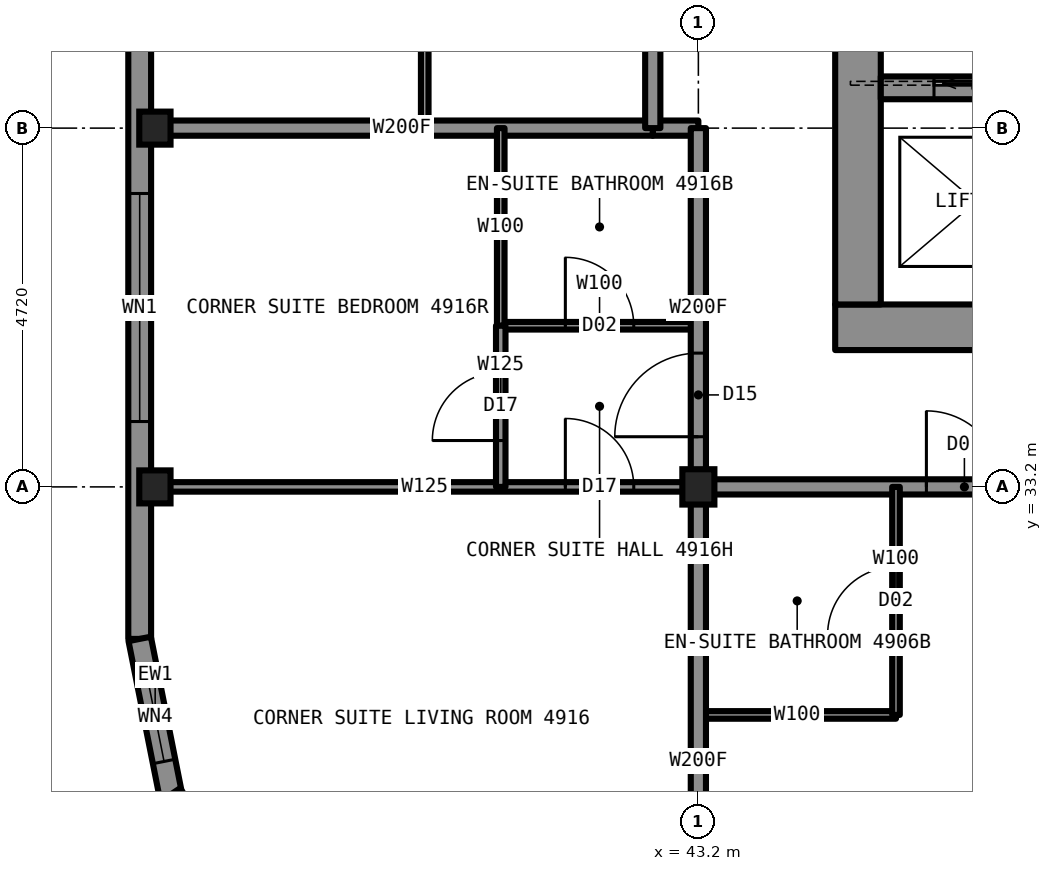
"""IFC4 building model, lengths in metres.
Left out: names, types, materials, properties, quantities, classifications, styles, units other than length and angle.
Written with IfcOpenShell. Run it as: python <this file> out.ifc"""

import sys

from ifc_helpers import new_model, si_unit, direction, frame, frame_2d, origin, origin_2d, place, context, subcontext, project, spatial, rectangle, i_section, extrude, element, fill, save


model = new_model("IFC4")
c1 = context("Model", 3, precision=1e-05, world=origin(), true_north=direction((0.0, 1.0)))
c2 = subcontext(c1, "Body", "Model", "MODEL_VIEW")
j1 = project(units=[si_unit("LENGTHUNIT", "METRE"), si_unit("PLANEANGLEUNIT", "RADIAN")], contexts=[c1])
p1 = place(None, origin())
s1 = spatial("IfcSite", under=j1, at=p1, CompositionType="ELEMENT")
p2 = place(p1, origin())
s2 = spatial("IfcBuilding", under=s1, at=p2, CompositionType="ELEMENT")
p3 = place(p2, frame((0.0, 0.0, 182.8)))
s3 = spatial("IfcBuildingStorey", under=s2, at=p3, CompositionType="ELEMENT", Elevation=182.8)
for number, where, z_axis, x_axis in (
    (1, (36.05, 33.2, 0.0), (0.0, 0.0, 1.0), (1.0, 0.0, 0.0)),
    (2, (36.05, 37.92, 0.0), (0.0, 0.0, 1.0), (1.0, 0.0, 0.0)),
):
    element("IfcColumn", number, at=place(p3, frame(where, z_axis=z_axis, x_axis=x_axis)), inside=s3, PredefinedType="COLUMN", context=c2, shape_type="SweptSolid", body=[
        extrude(i_section(OverallWidth=0.411, OverallDepth=0.434, WebThickness=0.036, FlangeThickness=0.057, at=origin_2d()), origin(), (0.0, 0.0, 1.0), 3.5),
    ])
p4 = place(p3, frame((43.2, 33.2, 0.0), z_axis=(0.0, 0.0, 1.0), x_axis=(1.0, 0.0, 0.0)))
e3 = element("IfcColumn", 3, at=p4, inside=s3, PredefinedType="COLUMN", context=c2, shape_type="SweptSolid", body=[
    extrude(i_section(OverallWidth=0.422, OverallDepth=0.465, WebThickness=0.045, FlangeThickness=0.073, at=origin_2d()), origin(), (0.0, 0.0, 1.0), 3.5),
])
p5 = place(p3, frame((45.0, 35.3, 0.0), z_axis=(0.0, 0.0, 1.0), x_axis=(1.0, 0.0, 0.0)))
e4 = element("IfcWall", 4, at=p5, inside=s3, PredefinedType="SHEAR", context=c2, shape_type="SweptSolid", body=[
    extrude(rectangle(XDim=20.0, YDim=0.6, at=frame_2d((10.0, 0.0))), origin(), (0.0, 0.0, 1.0), 3.5),
])
p6 = place(p3, frame((45.3, 35.6, 0.0), z_axis=(0.0, 0.0, 1.0), x_axis=(0.0, 1.0, 0.0)))
e5 = element("IfcWall", 5, at=p6, inside=s3, PredefinedType="SHEAR", context=c2, shape_type="SweptSolid", body=[
    extrude(rectangle(XDim=18.8, YDim=0.6, at=frame_2d((9.4, 0.0))), origin(), (0.0, 0.0, 1.0), 3.5),
])
p7 = place(p6, frame((13.4, 0.0, 0.0)))
e6 = element("IfcOpeningElement", 6, at=p7, cuts=e5, PredefinedType="OPENING", context=c2, shape_type="SweptSolid", body=[
    extrude(rectangle(XDim=1.8, YDim=2.2, at=frame_2d((0.9, 1.1))), frame((0.0, 0.31, 0.0), z_axis=(0.0, -1.0, 0.0), x_axis=(1.0, 0.0, 0.0)), (0.0, 0.0, 1.0), 0.62),
])
p8 = place(p6, frame((3.6, 0.0, 0.0)))
e7 = element("IfcOpeningElement", 7, at=p8, cuts=e5, PredefinedType="OPENING", context=c2, shape_type="SweptSolid", body=[
    extrude(rectangle(XDim=1.8, YDim=2.2, at=frame_2d((0.9, 1.1))), frame((0.0, 0.31, 0.0), z_axis=(0.0, -1.0, 0.0), x_axis=(1.0, 0.0, 0.0)), (0.0, 0.0, 1.0), 0.62),
])
p9 = place(p6, frame((6.4, 0.0, 0.0)))
e8 = element("IfcOpeningElement", 8, at=p9, cuts=e5, PredefinedType="OPENING", context=c2, shape_type="SweptSolid", body=[
    extrude(rectangle(XDim=1.2, YDim=2.2, at=frame_2d((0.6, 1.1))), frame((0.0, 0.31, 0.0), z_axis=(0.0, -1.0, 0.0), x_axis=(1.0, 0.0, 0.0)), (0.0, 0.0, 1.0), 0.62),
])
p10 = place(p3, frame((45.6, 38.45, 0.0), z_axis=(0.0, 0.0, 1.0), x_axis=(1.0, 0.0, 0.0)))
e9 = element("IfcWall", 9, at=p10, inside=s3, PredefinedType="SHEAR", context=c2, shape_type="SweptSolid", body=[
    extrude(rectangle(XDim=18.8, YDim=0.3, at=frame_2d((9.4, 0.0))), origin(), (0.0, 0.0, 1.0), 3.5),
])
p11 = place(p10, frame((0.7, 0.0, 0.0)))
e10 = element("IfcOpeningElement", 10, at=p11, cuts=e9, PredefinedType="OPENING", context=c2, shape_type="SweptSolid", body=[
    extrude(rectangle(XDim=1.1, YDim=2.2, at=frame_2d((0.55, 1.1))), frame((0.0, 0.16, 0.0), z_axis=(0.0, -1.0, 0.0), x_axis=(1.0, 0.0, 0.0)), (0.0, 0.0, 1.0), 0.32),
])
p12 = place(p10, frame((3.4, 0.0, 0.0)))
e11 = element("IfcOpeningElement", 11, at=p12, cuts=e9, PredefinedType="OPENING", context=c2, shape_type="SweptSolid", body=[
    extrude(rectangle(XDim=1.1, YDim=2.2, at=frame_2d((0.55, 1.1))), frame((0.0, 0.16, 0.0), z_axis=(0.0, -1.0, 0.0), x_axis=(1.0, 0.0, 0.0)), (0.0, 0.0, 1.0), 0.32),
])
p13 = place(p10, frame((6.1, 0.0, 0.0)))
e12 = element("IfcOpeningElement", 12, at=p13, cuts=e9, PredefinedType="OPENING", context=c2, shape_type="SweptSolid", body=[
    extrude(rectangle(XDim=1.1, YDim=2.2, at=frame_2d((0.55, 1.1))), frame((0.0, 0.16, 0.0), z_axis=(0.0, -1.0, 0.0), x_axis=(1.0, 0.0, 0.0)), (0.0, 0.0, 1.0), 0.32),
])
p14 = place(p10, frame((8.8, 0.0, 0.0)))
e13 = element("IfcOpeningElement", 13, at=p14, cuts=e9, PredefinedType="OPENING", context=c2, shape_type="SweptSolid", body=[
    extrude(rectangle(XDim=1.1, YDim=2.2, at=frame_2d((0.55, 1.1))), frame((0.0, 0.16, 0.0), z_axis=(0.0, -1.0, 0.0), x_axis=(1.0, 0.0, 0.0)), (0.0, 0.0, 1.0), 0.32),
])
p15 = place(p3, frame((43.2, 33.2, 0.0), z_axis=(0.0, 0.0, 1.0), x_axis=(1.0, 0.0, 0.0)))
e14 = element("IfcWall", 14, at=p15, inside=s3, PredefinedType="PARTITIONING", context=c2, shape_type="SweptSolid", body=[
    extrude(rectangle(XDim=23.6, YDim=0.2, at=frame_2d((11.8, 0.0))), origin(), (0.0, 0.0, 1.0), 3.33),
])
p16 = place(p15, frame((3.0, 0.0, 0.0)))
e15 = element("IfcOpeningElement", 15, at=p16, cuts=e14, PredefinedType="OPENING", context=c2, shape_type="SweptSolid", body=[
    extrude(rectangle(XDim=1.0, YDim=2.2, at=frame_2d((0.5, 1.1))), frame((0.0, 0.11, 0.0), z_axis=(0.0, -1.0, 0.0), x_axis=(1.0, 0.0, 0.0)), (0.0, 0.0, 1.0), 0.22),
])
p17 = place(p15, frame((11.99, 0.0, 0.0)))
e16 = element("IfcOpeningElement", 16, at=p17, cuts=e14, PredefinedType="OPENING", context=c2, shape_type="SweptSolid", body=[
    extrude(rectangle(XDim=1.0, YDim=2.2, at=frame_2d((0.5, 1.1))), frame((0.0, 0.11, 0.0), z_axis=(0.0, -1.0, 0.0), x_axis=(1.0, 0.0, 0.0)), (0.0, 0.0, 1.0), 0.22),
])
p18 = place(p15, frame((16.71, 0.0, 0.0)))
e17 = element("IfcOpeningElement", 17, at=p18, cuts=e14, PredefinedType="OPENING", context=c2, shape_type="SweptSolid", body=[
    extrude(rectangle(XDim=1.0, YDim=2.2, at=frame_2d((0.5, 1.1))), frame((0.0, 0.11, 0.0), z_axis=(0.0, -1.0, 0.0), x_axis=(1.0, 0.0, 0.0)), (0.0, 0.0, 1.0), 0.22),
])
p19 = place(p15, frame((19.28, 0.0, 0.0)))
e18 = element("IfcOpeningElement", 18, at=p19, cuts=e14, PredefinedType="OPENING", context=c2, shape_type="SweptSolid", body=[
    extrude(rectangle(XDim=1.0, YDim=2.2, at=frame_2d((0.5, 1.1))), frame((0.0, 0.11, 0.0), z_axis=(0.0, -1.0, 0.0), x_axis=(1.0, 0.0, 0.0)), (0.0, 0.0, 1.0), 0.22),
])
p20 = place(p3, frame((36.0, 33.2, 0.0), z_axis=(0.0, 0.0, 1.0), x_axis=(1.0, 0.0, 0.0)))
e19 = element("IfcWall", 19, at=p20, inside=s3, PredefinedType="PARTITIONING", context=c2, shape_type="SweptSolid", body=[
    extrude(rectangle(XDim=7.2, YDim=0.125, at=frame_2d((3.6, 0.0))), origin(), (0.0, 0.0, 1.0), 2.573),
])
p21 = place(p20, frame((5.45, 0.0, 0.0)))
e20 = element("IfcOpeningElement", 20, at=p21, cuts=e19, PredefinedType="OPENING", context=c2, shape_type="SweptSolid", body=[
    extrude(rectangle(XDim=0.9, YDim=2.2, at=frame_2d((0.45, 1.1))), frame((0.0, 0.073, 0.0), z_axis=(0.0, -1.0, 0.0), x_axis=(1.0, 0.0, 0.0)), (0.0, 0.0, 1.0), 0.145),
])
p22 = place(p3, frame((43.2, 30.2, 0.0), z_axis=(0.0, 0.0, 1.0), x_axis=(1.0, 0.0, 0.0)))
e21 = element("IfcWall", 21, at=p22, inside=s3, PredefinedType="PARTITIONING", context=c2, shape_type="SweptSolid", body=[
    extrude(rectangle(XDim=2.6, YDim=0.1, at=frame_2d((1.3, 0.0))), origin(), (0.0, 0.0, 1.0), 3.33),
])
p23 = place(p3, frame((42.6, 37.92, 0.0), z_axis=(0.0, 0.0, 1.0), x_axis=(1.0, 0.0, 0.0)))
e22 = element("IfcWall", 22, at=p23, inside=s3, PredefinedType="PARTITIONING", context=c2, shape_type="SweptSolid", body=[
    extrude(rectangle(XDim=0.6, YDim=0.2, at=frame_2d((0.3, 0.0))), origin(), (0.0, 0.0, 1.0), 2.573),
])
p24 = place(p3, frame((36.0, 37.92, 0.0), z_axis=(0.0, 0.0, 1.0), x_axis=(1.0, 0.0, 0.0)))
e23 = element("IfcWall", 23, at=p24, inside=s3, PredefinedType="PARTITIONING", context=c2, shape_type="SweptSolid", body=[
    extrude(rectangle(XDim=6.6, YDim=0.2, at=frame_2d((3.3, 0.0))), origin(), (0.0, 0.0, 1.0), 2.573),
])
p25 = place(p3, frame((40.6, 35.32, 0.0), z_axis=(0.0, 0.0, 1.0), x_axis=(1.0, 0.0, 0.0)))
e24 = element("IfcWall", 24, at=p25, inside=s3, PredefinedType="PARTITIONING", context=c2, shape_type="SweptSolid", body=[
    extrude(rectangle(XDim=2.6, YDim=0.1, at=frame_2d((1.3, 0.0))), origin(), (0.0, 0.0, 1.0), 3.33),
])
p26 = place(p25, frame((0.85, 0.0, 0.0)))
e25 = element("IfcOpeningElement", 25, at=p26, cuts=e24, PredefinedType="OPENING", context=c2, shape_type="SweptSolid", body=[
    extrude(rectangle(XDim=0.9, YDim=2.1, at=frame_2d((0.45, 1.05))), frame((0.0, 0.06, 0.0), z_axis=(0.0, -1.0, 0.0), x_axis=(1.0, 0.0, 0.0)), (0.0, 0.0, 1.0), 0.12),
])
p27 = place(p3, frame((43.2, 33.2, 0.0), z_axis=(0.0, 0.0, 1.0), x_axis=(0.0, 1.0, 0.0)))
e26 = element("IfcWall", 26, at=p27, inside=s3, PredefinedType="PARTITIONING", context=c2, shape_type="SweptSolid", body=[
    extrude(rectangle(XDim=4.72, YDim=0.2, at=frame_2d((2.36, 0.0))), origin(), (0.0, 0.0, 1.0), 3.33),
])
p28 = place(p27, frame((0.66, 0.0, 0.0)))
e27 = element("IfcOpeningElement", 27, at=p28, cuts=e26, PredefinedType="OPENING", context=c2, shape_type="SweptSolid", body=[
    extrude(rectangle(XDim=1.1, YDim=2.2, at=frame_2d((0.55, 1.1))), frame((0.0, 0.11, 0.0), z_axis=(0.0, -1.0, 0.0), x_axis=(1.0, 0.0, 0.0)), (0.0, 0.0, 1.0), 0.22),
])
p29 = place(p3, frame((43.2, 26.0, 0.0), z_axis=(0.0, 0.0, 1.0), x_axis=(0.0, 1.0, 0.0)))
e28 = element("IfcWall", 28, at=p29, inside=s3, PredefinedType="PARTITIONING", context=c2, shape_type="SweptSolid", body=[
    extrude(rectangle(XDim=7.2, YDim=0.2, at=frame_2d((3.6, 0.0))), origin(), (0.0, 0.0, 1.0), 2.573),
])
p30 = place(p3, frame((42.6, 37.92, 0.0), z_axis=(0.0, 0.0, 1.0), x_axis=(0.0, 1.0, 0.0)))
e29 = element("IfcWall", 29, at=p30, inside=s3, PredefinedType="PARTITIONING", context=c2, shape_type="SweptSolid", body=[
    extrude(rectangle(XDim=14.16, YDim=0.2, at=frame_2d((7.08, 0.0))), origin(), (0.0, 0.0, 1.0), 3.33),
])
p31 = place(p30, frame((3.0, 0.0, 0.0)))
e30 = element("IfcOpeningElement", 30, at=p31, cuts=e29, PredefinedType="OPENING", context=c2, shape_type="SweptSolid", body=[
    extrude(rectangle(XDim=1.0, YDim=2.2, at=frame_2d((0.5, 1.1))), frame((0.0, 0.11, 0.0), z_axis=(0.0, -1.0, 0.0), x_axis=(1.0, 0.0, 0.0)), (0.0, 0.0, 1.0), 0.22),
])
p32 = place(p30, frame((11.99, 0.0, 0.0)))
e31 = element("IfcOpeningElement", 31, at=p32, cuts=e29, PredefinedType="OPENING", context=c2, shape_type="SweptSolid", body=[
    extrude(rectangle(XDim=1.0, YDim=2.2, at=frame_2d((0.5, 1.1))), frame((0.0, 0.11, 0.0), z_axis=(0.0, -1.0, 0.0), x_axis=(1.0, 0.0, 0.0)), (0.0, 0.0, 1.0), 0.22),
])
p33 = place(p3, frame((40.6, 35.32, 0.0), z_axis=(0.0, 0.0, 1.0), x_axis=(0.0, 1.0, 0.0)))
e32 = element("IfcWall", 32, at=p33, inside=s3, PredefinedType="PARTITIONING", context=c2, shape_type="SweptSolid", body=[
    extrude(rectangle(XDim=2.6, YDim=0.1, at=frame_2d((1.3, 0.0))), origin(), (0.0, 0.0, 1.0), 3.33),
])
p34 = place(p3, frame((40.6, 33.2, 0.0), z_axis=(0.0, 0.0, 1.0), x_axis=(0.0, 1.0, 0.0)))
e33 = element("IfcWall", 33, at=p34, inside=s3, PredefinedType="PARTITIONING", context=c2, shape_type="SweptSolid", body=[
    extrude(rectangle(XDim=2.12, YDim=0.125, at=frame_2d((1.06, 0.0))), origin(), (0.0, 0.0, 1.0), 3.33),
])
p35 = place(p34, frame((0.61, 0.0, 0.0)))
e34 = element("IfcOpeningElement", 34, at=p35, cuts=e33, PredefinedType="OPENING", context=c2, shape_type="SweptSolid", body=[
    extrude(rectangle(XDim=0.9, YDim=2.2, at=frame_2d((0.45, 1.1))), frame((0.0, 0.073, 0.0), z_axis=(0.0, -1.0, 0.0), x_axis=(1.0, 0.0, 0.0)), (0.0, 0.0, 1.0), 0.145),
])
p36 = place(p3, frame((39.6, 37.92, 0.0), z_axis=(0.0, 0.0, 1.0), x_axis=(0.0, 1.0, 0.0)))
e35 = element("IfcWall", 35, at=p36, inside=s3, PredefinedType="PARTITIONING", context=c2, shape_type="SweptSolid", body=[
    extrude(rectangle(XDim=2.6, YDim=0.1, at=frame_2d((1.3, 0.0))), origin(), (0.0, 0.0, 1.0), 3.33),
])
p37 = place(p3, frame((45.8, 30.2, 0.0), z_axis=(0.0, 0.0, 1.0), x_axis=(0.0, 1.0, 0.0)))
e36 = element("IfcWall", 36, at=p37, inside=s3, PredefinedType="PARTITIONING", context=c2, shape_type="SweptSolid", body=[
    extrude(rectangle(XDim=3.0, YDim=0.1, at=frame_2d((1.5, 0.0))), origin(), (0.0, 0.0, 1.0), 3.33),
])
p38 = place(p37, frame((1.05, 0.0, 0.0)))
e37 = element("IfcOpeningElement", 37, at=p38, cuts=e36, PredefinedType="OPENING", context=c2, shape_type="SweptSolid", body=[
    extrude(rectangle(XDim=0.9, YDim=2.1, at=frame_2d((0.45, 1.05))), frame((0.0, 0.06, 0.0), z_axis=(0.0, -1.0, 0.0), x_axis=(1.0, 0.0, 0.0)), (0.0, 0.0, 1.0), 0.12),
])
p39 = place(p3, frame((35.85, 58.8, 0.0), z_axis=(0.0, 0.0, 1.0), x_axis=(0.0, -1.0, 0.0)))
e38 = element("IfcWall", 38, at=p39, inside=s3, PredefinedType="SOLIDWALL", context=c2, shape_type="SweptSolid", body=[
    extrude(rectangle(XDim=27.6, YDim=0.3, at=frame_2d((13.8, 0.0))), origin(), (0.0, 0.0, 1.0), 2.83),
])
p40 = place(p39, frame((2.86, 0.0, 0.3)))
e39 = element("IfcOpeningElement", 39, at=p40, cuts=e38, PredefinedType="OPENING", context=c2, shape_type="SweptSolid", body=[
    extrude(rectangle(XDim=3.0, YDim=2.0, at=frame_2d((1.5, 1.0))), frame((0.0, 0.16, 0.0), z_axis=(0.0, -1.0, 0.0), x_axis=(1.0, 0.0, 0.0)), (0.0, 0.0, 1.0), 0.32),
])
p41 = place(p39, frame((9.88, 0.0, 0.3)))
e40 = element("IfcOpeningElement", 40, at=p41, cuts=e38, PredefinedType="OPENING", context=c2, shape_type="SweptSolid", body=[
    extrude(rectangle(XDim=0.7, YDim=1.1, at=frame_2d((0.35, 0.55))), frame((0.0, 0.16, 0.0), z_axis=(0.0, -1.0, 0.0), x_axis=(1.0, 0.0, 0.0)), (0.0, 0.0, 1.0), 0.32),
])
p42 = place(p39, frame((12.3, 0.0, 0.3)))
e41 = element("IfcOpeningElement", 41, at=p42, cuts=e38, PredefinedType="OPENING", context=c2, shape_type="SweptSolid", body=[
    extrude(rectangle(XDim=3.0, YDim=2.0, at=frame_2d((1.5, 1.0))), frame((0.0, 0.16, 0.0), z_axis=(0.0, -1.0, 0.0), x_axis=(1.0, 0.0, 0.0)), (0.0, 0.0, 1.0), 0.32),
])
p43 = place(p39, frame((17.02, 0.0, 0.3)))
e42 = element("IfcOpeningElement", 42, at=p43, cuts=e38, PredefinedType="OPENING", context=c2, shape_type="SweptSolid", body=[
    extrude(rectangle(XDim=0.7, YDim=1.1, at=frame_2d((0.35, 0.55))), frame((0.0, 0.16, 0.0), z_axis=(0.0, -1.0, 0.0), x_axis=(1.0, 0.0, 0.0)), (0.0, 0.0, 1.0), 0.32),
])
p44 = place(p39, frame((21.74, 0.0, 0.3)))
e43 = element("IfcOpeningElement", 43, at=p44, cuts=e38, PredefinedType="OPENING", context=c2, shape_type="SweptSolid", body=[
    extrude(rectangle(XDim=3.0, YDim=2.0, at=frame_2d((1.5, 1.0))), frame((0.0, 0.16, 0.0), z_axis=(0.0, -1.0, 0.0), x_axis=(1.0, 0.0, 0.0)), (0.0, 0.0, 1.0), 0.32),
])
p45 = place(p3, frame((35.85, 31.2, 0.0), z_axis=(0.0, 0.0, 1.0), x_axis=(0.195081421501, -0.980787050784, 0.0)))
e44 = element("IfcWall", 44, at=p45, inside=s3, PredefinedType="SOLIDWALL", context=c2, shape_type="SweptSolid", body=[
    extrude(rectangle(XDim=2.087, YDim=0.3, at=frame_2d((1.044, 0.0))), origin(), (0.0, 0.0, 1.0), 3.33),
])
p46 = place(p45, frame((0.444, 0.0, 0.3)))
e45 = element("IfcOpeningElement", 45, at=p46, cuts=e44, PredefinedType="OPENING", context=c2, shape_type="SweptSolid", body=[
    extrude(rectangle(XDim=1.2, YDim=2.0, at=frame_2d((0.6, 1.0))), frame((0.0, 0.16, 0.0), z_axis=(0.0, -1.0, 0.0), x_axis=(1.0, 0.0, 0.0)), (0.0, 0.0, 1.0), 0.32),
])
p47 = place(p3, frame((36.257, 29.153, 0.0), z_axis=(0.0, 0.0, 1.0), x_axis=(0.555563607591, -0.831474039234, 0.0)))
e46 = element("IfcWall", 46, at=p47, inside=s3, PredefinedType="SOLIDWALL", context=c2, shape_type="SweptSolid", body=[
    extrude(rectangle(XDim=2.087, YDim=0.3, at=frame_2d((1.044, 0.0))), origin(), (0.0, 0.0, 1.0), 3.33),
])
p48 = place(p47, frame((0.444, 0.0, 0.3)))
e47 = element("IfcOpeningElement", 47, at=p48, cuts=e46, PredefinedType="OPENING", context=c2, shape_type="SweptSolid", body=[
    extrude(rectangle(XDim=1.2, YDim=2.0, at=frame_2d((0.6, 1.0))), frame((0.0, 0.16, 0.0), z_axis=(0.0, -1.0, 0.0), x_axis=(1.0, 0.0, 0.0)), (0.0, 0.0, 1.0), 0.32),
])
p49 = place(p16, origin())
e48 = element("IfcDoor", 48, at=p49, inside=s3, OperationType="SINGLE_SWING_LEFT", PredefinedType="DOOR", context=c2, shape_type="SweptSolid", body=[
    extrude(rectangle(XDim=1.0, YDim=2.2, at=frame_2d((0.5, 1.1))), frame((0.0, 0.025, 0.0), z_axis=(0.0, -1.0, 0.0), x_axis=(1.0, 0.0, 0.0)), (0.0, 0.0, 1.0), 0.05),
])
fill(e15, e48)
p50 = place(p38, origin())
e49 = element("IfcDoor", 49, at=p50, inside=s3, OperationType="SINGLE_SWING_RIGHT", PredefinedType="DOOR", context=c2, shape_type="SweptSolid", body=[
    extrude(rectangle(XDim=0.9, YDim=2.1, at=frame_2d((0.45, 1.05))), frame((0.0, 0.025, 0.0), z_axis=(0.0, -1.0, 0.0), x_axis=(1.0, 0.0, 0.0)), (0.0, 0.0, 1.0), 0.05),
])
fill(e37, e49)
p51 = place(p21, origin())
e50 = element("IfcDoor", 50, at=p51, inside=s3, OperationType="SINGLE_SWING_LEFT", PredefinedType="DOOR", context=c2, shape_type="SweptSolid", body=[
    extrude(rectangle(XDim=0.9, YDim=2.2, at=frame_2d((0.45, 1.1))), frame((0.0, 0.025, 0.0), z_axis=(0.0, -1.0, 0.0), x_axis=(1.0, 0.0, 0.0)), (0.0, 0.0, 1.0), 0.05),
])
fill(e20, e50)
p52 = place(p26, origin())
e51 = element("IfcDoor", 51, at=p52, inside=s3, OperationType="SINGLE_SWING_RIGHT", PredefinedType="DOOR", context=c2, shape_type="SweptSolid", body=[
    extrude(rectangle(XDim=0.9, YDim=2.1, at=frame_2d((0.45, 1.05))), frame((0.0, 0.025, 0.0), z_axis=(0.0, -1.0, 0.0), x_axis=(1.0, 0.0, 0.0)), (0.0, 0.0, 1.0), 0.05),
])
fill(e25, e51)
p53 = place(p28, origin())
e52 = element("IfcDoor", 52, at=p53, inside=s3, OperationType="SINGLE_SWING_LEFT", PredefinedType="DOOR", context=c2, shape_type="SweptSolid", body=[
    extrude(rectangle(XDim=1.1, YDim=2.2, at=frame_2d((0.55, 1.1))), frame((0.0, 0.025, 0.0), z_axis=(0.0, -1.0, 0.0), x_axis=(1.0, 0.0, 0.0)), (0.0, 0.0, 1.0), 0.05),
])
fill(e27, e52)
p54 = place(p35, origin())
e53 = element("IfcDoor", 53, at=p54, inside=s3, OperationType="SINGLE_SWING_LEFT", PredefinedType="DOOR", context=c2, shape_type="SweptSolid", body=[
    extrude(rectangle(XDim=0.9, YDim=2.2, at=frame_2d((0.45, 1.1))), frame((0.0, 0.025, 0.0), z_axis=(0.0, -1.0, 0.0), x_axis=(1.0, 0.0, 0.0)), (0.0, 0.0, 1.0), 0.05),
])
fill(e34, e53)
p55 = place(p44, origin())
e54 = element("IfcWindow", 54, at=p55, inside=s3, PartitioningType="SINGLE_PANEL", PredefinedType="WINDOW", context=c2, shape_type="SweptSolid", body=[
    extrude(rectangle(XDim=3.0, YDim=2.0, at=frame_2d((1.5, 1.0))), frame((0.0, 0.13, 0.0), z_axis=(0.0, -1.0, 0.0), x_axis=(1.0, 0.0, 0.0)), (0.0, 0.0, 1.0), 0.06),
])
fill(e43, e54)
p56 = place(p46, origin())
e55 = element("IfcWindow", 55, at=p56, inside=s3, PartitioningType="SINGLE_PANEL", PredefinedType="WINDOW", context=c2, shape_type="SweptSolid", body=[
    extrude(rectangle(XDim=1.2, YDim=2.0, at=frame_2d((0.6, 1.0))), frame((0.0, 0.13, 0.0), z_axis=(0.0, -1.0, 0.0), x_axis=(1.0, 0.0, 0.0)), (0.0, 0.0, 1.0), 0.06),
])
fill(e45, e55)
p57 = place(p11, origin())
e56 = element("IfcDoor", 56, at=p57, inside=s3, OperationType="SLIDING_TO_LEFT", PredefinedType="DOOR", context=c2, shape_type="SweptSolid", body=[
    extrude(rectangle(XDim=1.1, YDim=2.2, at=frame_2d((0.55, 1.1))), frame((0.0, 0.025, 0.0), z_axis=(0.0, -1.0, 0.0), x_axis=(1.0, 0.0, 0.0)), (0.0, 0.0, 1.0), 0.05),
])
fill(e10, e56)
save(model, sys.argv[1])
